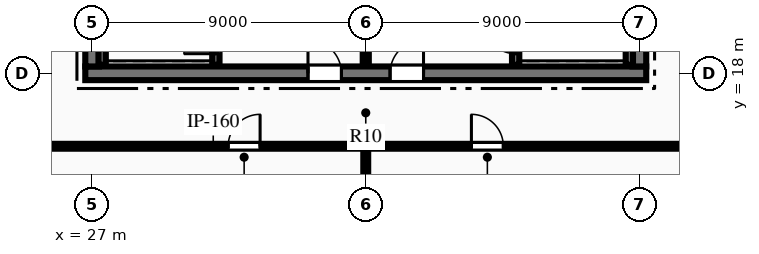
"""IFC4 building model, lengths in metres.
Left out: names, types, materials, properties, quantities, classifications, styles, units other than length and angle.
Written with IfcOpenShell. Run it as: python <this file> out.ifc"""

import sys

from ifc_helpers import new_model, si_unit, direction, frame, frame_2d, origin, place, context, subcontext, project, spatial, rectangle, extrude, element, fill, save


model = new_model("IFC4")
c1 = context("Model", 3, precision=1e-05, world=origin(), true_north=direction((0.0, 1.0)))
c2 = subcontext(c1, "Body", "Model", "MODEL_VIEW")
j1 = project(units=[si_unit("LENGTHUNIT", "METRE"), si_unit("PLANEANGLEUNIT", "RADIAN")], contexts=[c1])
p1 = place(None, origin())
s1 = spatial("IfcSite", under=j1, at=p1, CompositionType="ELEMENT")
p2 = place(p1, origin())
s2 = spatial("IfcBuilding", under=s1, at=p2, CompositionType="ELEMENT")
p3 = place(p2, frame((0.0, 0.0, 367.8)))
s3 = spatial("IfcBuildingStorey", under=s2, at=p3, CompositionType="ELEMENT", Elevation=367.8)
p4 = place(p3, frame((26.775, 18.0, 0.0), z_axis=(0.0, 0.0, 1.0), x_axis=(1.0, 0.0, 0.0)))
e1 = element("IfcWall", 1, at=p4, inside=s3, PredefinedType="SHEAR", context=c2, shape_type="SweptSolid", body=[
    extrude(rectangle(XDim=18.45, YDim=0.45, at=frame_2d((9.225, 0.0))), origin(), (0.0, 0.0, 1.0), 3.6),
])
p5 = place(p4, frame((7.325, 0.0, 0.0)))
e2 = element("IfcOpeningElement", 2, at=p5, cuts=e1, PredefinedType="OPENING", context=c2, shape_type="SweptSolid", body=[
    extrude(rectangle(XDim=1.1, YDim=2.15, at=frame_2d((0.55, 1.075))), frame((0.0, 0.235, 0.0), z_axis=(0.0, -1.0, 0.0), x_axis=(1.0, 0.0, 0.0)), (0.0, 0.0, 1.0), 0.47),
])
p6 = place(p4, frame((10.025, 0.0, 0.0)))
e3 = element("IfcOpeningElement", 3, at=p6, cuts=e1, PredefinedType="OPENING", context=c2, shape_type="SweptSolid", body=[
    extrude(rectangle(XDim=1.1, YDim=2.15, at=frame_2d((0.55, 1.075))), frame((0.0, 0.235, 0.0), z_axis=(0.0, -1.0, 0.0), x_axis=(1.0, 0.0, 0.0)), (0.0, 0.0, 1.0), 0.47),
])
p7 = place(p3, frame((27.0, 18.225, 0.0), z_axis=(0.0, 0.0, 1.0), x_axis=(0.0, 1.0, 0.0)))
e4 = element("IfcWall", 4, at=p7, inside=s3, PredefinedType="SHEAR", context=c2, shape_type="SweptSolid", body=[
    extrude(rectangle(XDim=15.55, YDim=0.45, at=frame_2d((7.775, 0.0))), origin(), (0.0, 0.0, 1.0), 3.6),
])
p8 = place(p7, frame((10.015, 0.0, 0.0)))
e5 = element("IfcOpeningElement", 5, at=p8, cuts=e4, PredefinedType="OPENING", context=c2, shape_type="SweptSolid", body=[
    extrude(rectangle(XDim=1.4, YDim=2.2, at=frame_2d((0.7, 1.1))), frame((0.0, 0.235, 0.0), z_axis=(0.0, -1.0, 0.0), x_axis=(1.0, 0.0, 0.0)), (0.0, 0.0, 1.0), 0.47),
])
p9 = place(p3, frame((45.0, 18.225, 0.0), z_axis=(0.0, 0.0, 1.0), x_axis=(0.0, 1.0, 0.0)))
e6 = element("IfcWall", 6, at=p9, inside=s3, PredefinedType="SHEAR", context=c2, shape_type="SweptSolid", body=[
    extrude(rectangle(XDim=15.55, YDim=0.45, at=frame_2d((7.775, 0.0))), origin(), (0.0, 0.0, 1.0), 3.6),
])
p10 = place(p9, frame((10.015, 0.0, 0.0)))
e7 = element("IfcOpeningElement", 7, at=p10, cuts=e6, PredefinedType="OPENING", context=c2, shape_type="SweptSolid", body=[
    extrude(rectangle(XDim=1.4, YDim=2.2, at=frame_2d((0.7, 1.1))), frame((0.0, 0.235, 0.0), z_axis=(0.0, -1.0, 0.0), x_axis=(1.0, 0.0, 0.0)), (0.0, 0.0, 1.0), 0.47),
])
p11 = place(p3, frame((31.07, 18.28, 0.0), z_axis=(0.0, 0.0, 1.0), x_axis=(0.0, 1.0, 0.0)))
e8 = element("IfcWall", 8, at=p11, inside=s3, PredefinedType="SHEAR", context=c2, shape_type="SweptSolid", body=[
    extrude(rectangle(XDim=8.26, YDim=0.24, at=frame_2d((4.13, 0.0))), origin(), (0.0, 0.0, 1.0), 3.6),
])
p12 = place(p11, frame((0.365, 0.0, 0.0)))
e9 = element("IfcOpeningElement", 9, at=p12, cuts=e8, PredefinedType="OPENING", context=c2, shape_type="SweptSolid", body=[
    extrude(rectangle(XDim=1.05, YDim=2.15, at=frame_2d((0.525, 1.075))), frame((0.0, 0.13, 0.0), z_axis=(0.0, -1.0, 0.0), x_axis=(1.0, 0.0, 0.0)), (0.0, 0.0, 1.0), 0.26),
])
p13 = place(p3, frame((27.33, 18.28, 0.0), z_axis=(0.0, 0.0, 1.0), x_axis=(0.0, 1.0, 0.0)))
e10 = element("IfcWall", 10, at=p13, inside=s3, PredefinedType="SHEAR", context=c2, shape_type="SweptSolid", body=[
    extrude(rectangle(XDim=8.26, YDim=0.24, at=frame_2d((4.13, 0.0))), origin(), (0.0, 0.0, 1.0), 3.6),
])
p14 = place(p3, frame((40.93, 18.28, 0.0), z_axis=(0.0, 0.0, 1.0), x_axis=(0.0, 1.0, 0.0)))
e11 = element("IfcWall", 11, at=p14, inside=s3, PredefinedType="SHEAR", context=c2, shape_type="SweptSolid", body=[
    extrude(rectangle(XDim=8.26, YDim=0.24, at=frame_2d((4.13, 0.0))), origin(), (0.0, 0.0, 1.0), 3.6),
])
p15 = place(p14, frame((0.365, 0.0, 0.0)))
e12 = element("IfcOpeningElement", 12, at=p15, cuts=e11, PredefinedType="OPENING", context=c2, shape_type="SweptSolid", body=[
    extrude(rectangle(XDim=1.05, YDim=2.15, at=frame_2d((0.525, 1.075))), frame((0.0, 0.13, 0.0), z_axis=(0.0, -1.0, 0.0), x_axis=(1.0, 0.0, 0.0)), (0.0, 0.0, 1.0), 0.26),
])
p16 = place(p3, frame((44.67, 18.28, 0.0), z_axis=(0.0, 0.0, 1.0), x_axis=(0.0, 1.0, 0.0)))
e13 = element("IfcWall", 13, at=p16, inside=s3, PredefinedType="SHEAR", context=c2, shape_type="SweptSolid", body=[
    extrude(rectangle(XDim=8.26, YDim=0.24, at=frame_2d((4.13, 0.0))), origin(), (0.0, 0.0, 1.0), 3.6),
])
p17 = place(p3, frame((36.0, 18.28, 0.0), z_axis=(0.0, 0.0, 1.0), x_axis=(0.0, 1.0, 0.0)))
e14 = element("IfcWall", 14, at=p17, inside=s3, PredefinedType="PARTITIONING", context=c2, shape_type="SweptSolid", body=[
    extrude(rectangle(XDim=3.77, YDim=0.2, at=frame_2d((1.885, 0.0))), origin(), (0.0, 0.0, 1.0), 3.33),
])
p18 = place(p3, frame((24.6, 15.6, 0.0), z_axis=(0.0, 0.0, 1.0), x_axis=(1.0, 0.0, 0.0)))
e15 = element("IfcWall", 15, at=p18, inside=s3, PredefinedType="PARTITIONING", context=c2, shape_type="SweptSolid", body=[
    extrude(rectangle(XDim=22.8, YDim=0.16, at=frame_2d((11.4, 0.0))), origin(), (0.0, 0.0, 1.0), 3.33),
])
p19 = place(p18, frame((6.875, 0.0, 0.0)))
e16 = element("IfcOpeningElement", 16, at=p19, cuts=e15, PredefinedType="OPENING", context=c2, shape_type="SweptSolid", body=[
    extrude(rectangle(XDim=1.05, YDim=2.15, at=frame_2d((0.525, 1.075))), frame((0.0, 0.09, 0.0), z_axis=(0.0, -1.0, 0.0), x_axis=(1.0, 0.0, 0.0)), (0.0, 0.0, 1.0), 0.18),
])
p20 = place(p18, frame((14.875, 0.0, 0.0)))
e17 = element("IfcOpeningElement", 17, at=p20, cuts=e15, PredefinedType="OPENING", context=c2, shape_type="SweptSolid", body=[
    extrude(rectangle(XDim=1.05, YDim=2.15, at=frame_2d((0.525, 1.075))), frame((0.0, 0.09, 0.0), z_axis=(0.0, -1.0, 0.0), x_axis=(1.0, 0.0, 0.0)), (0.0, 0.0, 1.0), 0.18),
])
p21 = place(p3, frame((36.0, 4.38, 0.0), z_axis=(0.0, 0.0, 1.0), x_axis=(0.0, 1.0, 0.0)))
e18 = element("IfcWall", 18, at=p21, inside=s3, PredefinedType="PARTITIONING", context=c2, shape_type="SweptSolid", body=[
    extrude(rectangle(XDim=11.22, YDim=0.16, at=frame_2d((5.61, 0.0))), origin(), (0.0, 0.0, 1.0), 3.33),
])
p22 = place(p12, origin())
e19 = element("IfcDoor", 19, at=p22, inside=s3, OperationType="SINGLE_SWING_LEFT", PredefinedType="DOOR", context=c2, shape_type="SweptSolid", body=[
    extrude(rectangle(XDim=1.05, YDim=2.15, at=frame_2d((0.525, 1.075))), frame((0.0, 0.025, 0.0), z_axis=(0.0, -1.0, 0.0), x_axis=(1.0, 0.0, 0.0)), (0.0, 0.0, 1.0), 0.05),
])
fill(e9, e19)
p23 = place(p15, origin())
e20 = element("IfcDoor", 20, at=p23, inside=s3, OperationType="SINGLE_SWING_RIGHT", PredefinedType="DOOR", context=c2, shape_type="SweptSolid", body=[
    extrude(rectangle(XDim=1.05, YDim=2.15, at=frame_2d((0.525, 1.075))), frame((0.0, 0.025, 0.0), z_axis=(0.0, -1.0, 0.0), x_axis=(1.0, 0.0, 0.0)), (0.0, 0.0, 1.0), 0.05),
])
fill(e12, e20)
p24 = place(p5, origin())
e21 = element("IfcDoor", 21, at=p24, inside=s3, OperationType="SINGLE_SWING_LEFT", PredefinedType="DOOR", context=c2, shape_type="SweptSolid", body=[
    extrude(rectangle(XDim=1.1, YDim=2.15, at=frame_2d((0.55, 1.075))), frame((0.0, 0.025, 0.0), z_axis=(0.0, -1.0, 0.0), x_axis=(1.0, 0.0, 0.0)), (0.0, 0.0, 1.0), 0.05),
])
fill(e2, e21)
p25 = place(p6, origin())
e22 = element("IfcDoor", 22, at=p25, inside=s3, OperationType="SINGLE_SWING_RIGHT", PredefinedType="DOOR", context=c2, shape_type="SweptSolid", body=[
    extrude(rectangle(XDim=1.1, YDim=2.15, at=frame_2d((0.55, 1.075))), frame((0.0, 0.025, 0.0), z_axis=(0.0, -1.0, 0.0), x_axis=(1.0, 0.0, 0.0)), (0.0, 0.0, 1.0), 0.05),
])
fill(e3, e22)
p26 = place(p19, origin())
e23 = element("IfcDoor", 23, at=p26, inside=s3, OperationType="SINGLE_SWING_RIGHT", PredefinedType="DOOR", context=c2, shape_type="SweptSolid", body=[
    extrude(rectangle(XDim=1.05, YDim=2.15, at=frame_2d((0.525, 1.075))), frame((0.0, 0.025, 0.0), z_axis=(0.0, -1.0, 0.0), x_axis=(1.0, 0.0, 0.0)), (0.0, 0.0, 1.0), 0.05),
])
fill(e16, e23)
p27 = place(p20, origin())
e24 = element("IfcDoor", 24, at=p27, inside=s3, OperationType="SINGLE_SWING_LEFT", PredefinedType="DOOR", context=c2, shape_type="SweptSolid", body=[
    extrude(rectangle(XDim=1.05, YDim=2.15, at=frame_2d((0.525, 1.075))), frame((0.0, 0.025, 0.0), z_axis=(0.0, -1.0, 0.0), x_axis=(1.0, 0.0, 0.0)), (0.0, 0.0, 1.0), 0.05),
])
fill(e17, e24)
save(model, sys.argv[1])
